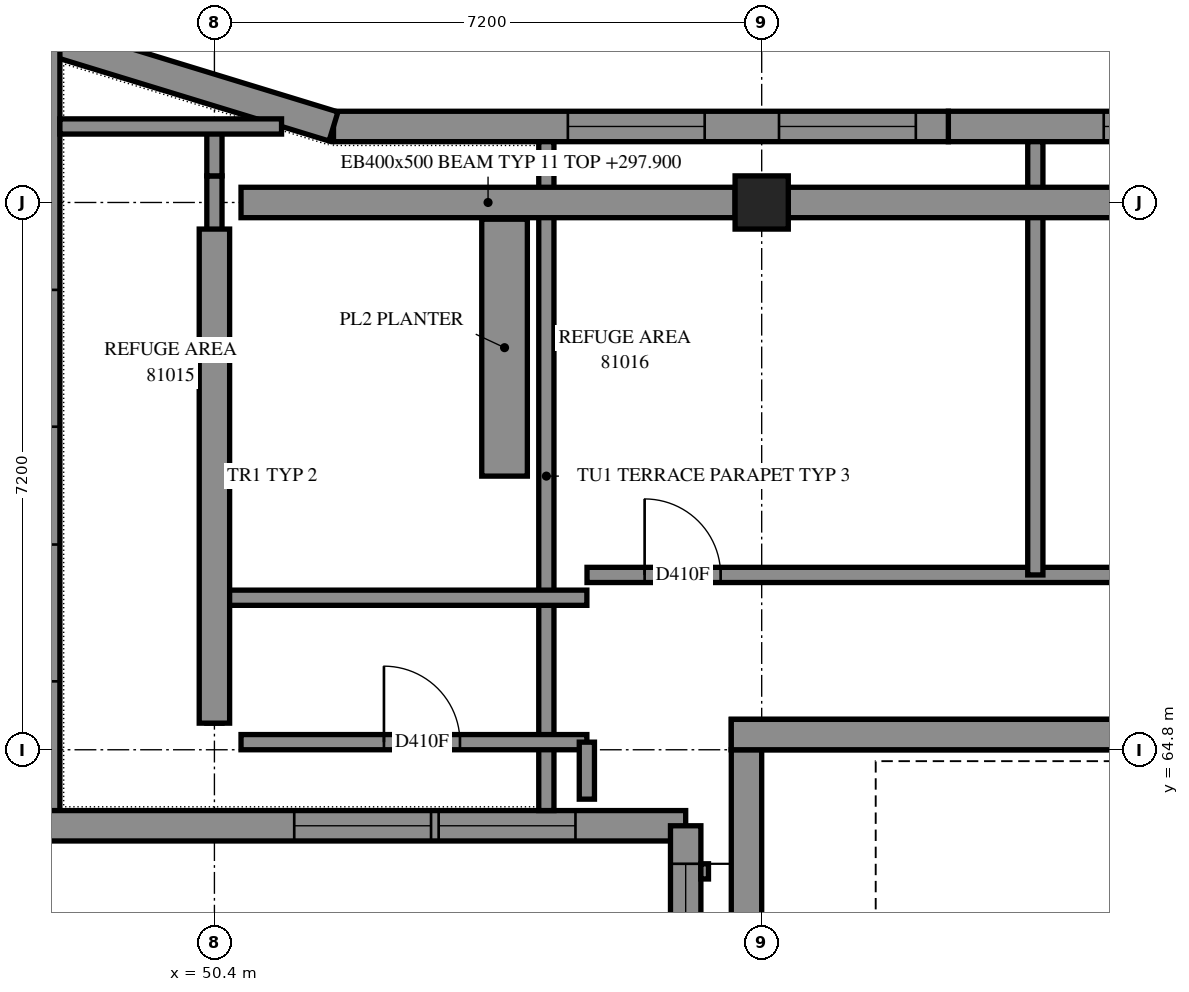
"""IFC4 building model, lengths in metres.
Left out: names, types, materials, properties, quantities, classifications, styles, units other than length and angle.
Written with IfcOpenShell. Run it as: python <this file> out.ifc"""

import sys

from ifc_helpers import new_model, si_unit, direction, frame, frame_2d, origin, origin_2d, place, context, subcontext, project, spatial, polyline, rectangle, outline, extrude, element, fill, save


model = new_model("IFC4")
c1 = context("Model", 3, precision=1e-05, world=origin(), true_north=direction((0.0, 1.0)))
c2 = subcontext(c1, "Body", "Model", "MODEL_VIEW")
j1 = project(units=[si_unit("LENGTHUNIT", "METRE"), si_unit("PLANEANGLEUNIT", "RADIAN")], contexts=[c1])
p1 = place(None, origin())
s1 = spatial("IfcSite", under=j1, at=p1, CompositionType="ELEMENT")
p2 = place(p1, origin())
s2 = spatial("IfcBuilding", under=s1, at=p2, CompositionType="ELEMENT")
p3 = place(p2, frame((0.0, 0.0, 298.2)))
s3 = spatial("IfcBuildingStorey", under=s2, at=p3, CompositionType="ELEMENT", Elevation=298.2)
p4 = place(p3, frame((57.6, 72.0, 0.0), z_axis=(0.0, 0.0, 1.0), x_axis=(1.0, 0.0, 0.0)))
e1 = element("IfcColumn", 1, at=p4, inside=s3, PredefinedType="COLUMN", context=c2, shape_type="SweptSolid", body=[
    extrude(rectangle(XDim=0.7, YDim=0.7, at=origin_2d()), origin(), (0.0, 0.0, 1.0), 3.5),
])
p5 = place(p3, frame((57.2, 65.0, -0.3), z_axis=(0.0, 0.0, 1.0), x_axis=(1.0, 0.0, 0.0)))
e2 = element("IfcWall", 2, at=p5, inside=s3, PredefinedType="SHEAR", context=c2, shape_type="SweptSolid", body=[
    extrude(outline(polyline([(0.0, 0.0), (15.2, 0.0), (15.2, 3.1), (0.0, 3.1), (0.0, 0.0)])), frame((0.0, 0.2, 0.0), z_axis=(0.0, -1.0, 0.0), x_axis=(1.0, 0.0, 0.0)), (0.0, 0.0, 1.0), 0.4),
])
p6 = place(p5, frame((10.4, 0.0, 0.3)))
e3 = element("IfcOpeningElement", 3, at=p6, cuts=e2, PredefinedType="OPENING", context=c2, shape_type="SweptSolid", body=[
    extrude(rectangle(XDim=0.8, YDim=2.1, at=frame_2d((0.4, 1.05))), frame((0.0, 0.21, 0.0), z_axis=(0.0, -1.0, 0.0), x_axis=(1.0, 0.0, 0.0)), (0.0, 0.0, 1.0), 0.42),
])
p7 = place(p3, frame((57.4, 57.1, -0.3), z_axis=(0.0, 0.0, 1.0), x_axis=(0.0, 1.0, 0.0)))
e4 = element("IfcWall", 4, at=p7, inside=s3, PredefinedType="SHEAR", context=c2, shape_type="SweptSolid", body=[
    extrude(outline(polyline([(0.0, 0.0), (7.7, 0.0), (7.7, 3.1), (0.0, 3.1), (0.0, 0.0)])), frame((0.0, 0.2, 0.0), z_axis=(0.0, -1.0, 0.0), x_axis=(1.0, 0.0, 0.0)), (0.0, 0.0, 1.0), 0.4),
])
p8 = place(p3, frame((68.115, 73.0, 0.0), z_axis=(0.0, 0.0, 1.0), x_axis=(-1.0, 0.0, 0.0)))
e5 = element("IfcWall", 5, at=p8, inside=s3, PredefinedType="SOLIDWALL", context=c2, shape_type="SweptSolid", body=[
    extrude(outline(polyline([(0.0, -0.2), (8.059, -0.2), (8.059, 0.2), (0.0, 0.2), (0.0, -0.2)])), origin(), (0.0, 0.0, 1.0), 3.0),
])
p9 = place(p8, frame((0.857, 0.0, 0.7)))
e6 = element("IfcOpeningElement", 6, at=p9, cuts=e5, PredefinedType="OPENING", context=c2, shape_type="SweptSolid", body=[
    extrude(rectangle(XDim=1.8, YDim=2.2, at=frame_2d((0.9, 1.1))), frame((0.0, 0.21, 0.0), z_axis=(0.0, -1.0, 0.0), x_axis=(1.0, 0.0, 0.0)), (0.0, 0.0, 1.0), 0.42),
])
p10 = place(p8, frame((4.215, 0.0, 0.7)))
e7 = element("IfcOpeningElement", 7, at=p10, cuts=e5, PredefinedType="OPENING", context=c2, shape_type="SweptSolid", body=[
    extrude(rectangle(XDim=1.8, YDim=2.2, at=frame_2d((0.9, 1.1))), frame((0.0, 0.21, 0.0), z_axis=(0.0, -1.0, 0.0), x_axis=(1.0, 0.0, 0.0)), (0.0, 0.0, 1.0), 0.42),
])
p11 = place(p3, frame((60.056, 73.0, 0.0), z_axis=(0.0, 0.0, 1.0), x_axis=(-1.0, 0.0, 0.0)))
e8 = element("IfcWall", 8, at=p11, inside=s3, PredefinedType="SOLIDWALL", context=c2, shape_type="SweptSolid", body=[
    extrude(outline(polyline([(0.0, -0.2), (8.059, -0.2), (8.119, 0.2), (0.0, 0.2), (0.0, -0.2)])), origin(), (0.0, 0.0, 1.0), 3.5),
])
p12 = place(p11, frame((0.428, 0.0, 0.7)))
e9 = element("IfcOpeningElement", 9, at=p12, cuts=e8, PredefinedType="OPENING", context=c2, shape_type="SweptSolid", body=[
    extrude(rectangle(XDim=1.8, YDim=2.2, at=frame_2d((0.9, 1.1))), frame((0.0, 0.21, 0.0), z_axis=(0.0, -1.0, 0.0), x_axis=(1.0, 0.0, 0.0)), (0.0, 0.0, 1.0), 0.42),
])
p13 = place(p11, frame((3.206, 0.0, 0.7)))
e10 = element("IfcOpeningElement", 10, at=p13, cuts=e8, PredefinedType="OPENING", context=c2, shape_type="SweptSolid", body=[
    extrude(rectangle(XDim=1.8, YDim=2.2, at=frame_2d((0.9, 1.1))), frame((0.0, 0.21, 0.0), z_axis=(0.0, -1.0, 0.0), x_axis=(1.0, 0.0, 0.0)), (0.0, 0.0, 1.0), 0.42),
])
p14 = place(p3, frame((51.967, 73.0, 0.0), z_axis=(0.0, 0.0, 1.0), x_axis=(-0.9562403408, 0.2925823144, 0.0)))
e11 = element("IfcWall", 11, at=p14, inside=s3, PredefinedType="SOLIDWALL", context=c2, shape_type="SweptSolid", body=[
    extrude(outline(polyline([(0.03, -0.2), (4.244, -0.2), (3.703, 0.2), (-0.03, 0.2), (0.03, -0.2)])), origin(), (0.0, 0.0, 1.0), 3.5),
])
p15 = place(p3, frame((48.167, 74.163, 0.0), z_axis=(0.0, 0.0, 1.0), x_axis=(0.0, -1.0, 0.0)))
e12 = element("IfcWall", 12, at=p15, inside=s3, PredefinedType="SOLIDWALL", context=c2, shape_type="SweptSolid", body=[
    extrude(outline(polyline([(-0.27, -0.2), (10.563, -0.2), (10.163, 0.2), (0.27, 0.2), (-0.27, -0.2)])), origin(), (0.0, 0.0, 1.0), 3.5),
])
p16 = place(p15, frame((3.313, 0.0, 0.7)))
e13 = element("IfcOpeningElement", 13, at=p16, cuts=e12, PredefinedType="OPENING", context=c2, shape_type="SweptSolid", body=[
    extrude(rectangle(XDim=1.8, YDim=2.2, at=frame_2d((0.9, 1.1))), frame((0.0, 0.21, 0.0), z_axis=(0.0, -1.0, 0.0), x_axis=(1.0, 0.0, 0.0)), (0.0, 0.0, 1.0), 0.42),
])
p17 = place(p15, frame((6.663, 0.0, 0.7)))
e14 = element("IfcOpeningElement", 14, at=p17, cuts=e12, PredefinedType="OPENING", context=c2, shape_type="SweptSolid", body=[
    extrude(rectangle(XDim=1.8, YDim=2.2, at=frame_2d((0.9, 1.1))), frame((0.0, 0.21, 0.0), z_axis=(0.0, -1.0, 0.0), x_axis=(1.0, 0.0, 0.0)), (0.0, 0.0, 1.0), 0.42),
])
p18 = place(p3, frame((48.167, 63.8, 0.0), z_axis=(0.0, 0.0, 1.0), x_axis=(1.0, 0.0, 0.0)))
e15 = element("IfcWall", 15, at=p18, inside=s3, PredefinedType="SOLIDWALL", context=c2, shape_type="SweptSolid", body=[
    extrude(outline(polyline([(-0.2, -0.2), (8.233, -0.2), (8.233, 0.2), (0.2, 0.2), (-0.2, -0.2)])), origin(), (0.0, 0.0, 1.0), 3.5),
])
p19 = place(p18, frame((3.283, 0.0, 0.7)))
e16 = element("IfcOpeningElement", 16, at=p19, cuts=e15, PredefinedType="OPENING", context=c2, shape_type="SweptSolid", body=[
    extrude(rectangle(XDim=1.8, YDim=2.2, at=frame_2d((0.9, 1.1))), frame((0.0, 0.21, 0.0), z_axis=(0.0, -1.0, 0.0), x_axis=(1.0, 0.0, 0.0)), (0.0, 0.0, 1.0), 0.42),
])
p20 = place(p18, frame((5.183, 0.0, 0.7)))
e17 = element("IfcOpeningElement", 17, at=p20, cuts=e15, PredefinedType="OPENING", context=c2, shape_type="SweptSolid", body=[
    extrude(rectangle(XDim=1.8, YDim=2.2, at=frame_2d((0.9, 1.1))), frame((0.0, 0.21, 0.0), z_axis=(0.0, -1.0, 0.0), x_axis=(1.0, 0.0, 0.0)), (0.0, 0.0, 1.0), 0.42),
])
p21 = place(p3, frame((56.6, 63.8, 0.0), z_axis=(0.0, 0.0, 1.0), x_axis=(0.0, -1.0, 0.0)))
e18 = element("IfcWall", 18, at=p21, inside=s3, PredefinedType="SOLIDWALL", context=c2, shape_type="SweptSolid", body=[
    extrude(outline(polyline([(-0.2, -0.2), (7.4, -0.2), (7.0, 0.2), (-0.2, 0.2), (-0.2, -0.2)])), origin(), (0.0, 0.0, 1.0), 3.5),
])
p22 = place(p21, frame((0.5, 0.0, 0.7)))
e19 = element("IfcOpeningElement", 19, at=p22, cuts=e18, PredefinedType="OPENING", context=c2, shape_type="SweptSolid", body=[
    extrude(rectangle(XDim=1.8, YDim=2.2, at=frame_2d((0.9, 1.1))), frame((0.0, 0.21, 0.0), z_axis=(0.0, -1.0, 0.0), x_axis=(1.0, 0.0, 0.0)), (0.0, 0.0, 1.0), 0.42),
])
p23 = place(p21, frame((3.5, 0.0, 0.7)))
e20 = element("IfcOpeningElement", 20, at=p23, cuts=e18, PredefinedType="OPENING", context=c2, shape_type="SweptSolid", body=[
    extrude(rectangle(XDim=1.8, YDim=2.2, at=frame_2d((0.9, 1.1))), frame((0.0, 0.21, 0.0), z_axis=(0.0, -1.0, 0.0), x_axis=(1.0, 0.0, 0.0)), (0.0, 0.0, 1.0), 0.42),
])
p24 = place(p3, frame((54.767, 64.0, 0.0), z_axis=(0.0, 0.0, 1.0), x_axis=(0.0, 1.0, 0.0)))
e21 = element("IfcWall", 21, at=p24, inside=s3, PredefinedType="PARAPET", context=c2, shape_type="SweptSolid", body=[
    extrude(outline(polyline([(0.0, -0.1), (8.8, -0.1), (8.8, 0.1), (0.0, 0.1), (0.0, -0.1)])), origin(), (0.0, 0.0, 1.0), 0.25),
])
p25 = place(p3, frame((56.9, 63.2, 0.0), z_axis=(0.0, 0.0, 1.0), x_axis=(-1.0, 0.0, 0.0)))
e22 = element("IfcWall", 22, at=p25, inside=s3, PredefinedType="PARAPET", context=c2, shape_type="SweptSolid", body=[
    extrude(outline(polyline([(0.0, -0.1), (0.1, -0.1), (0.1, 0.1), (0.0, 0.1), (0.0, -0.1)])), origin(), (0.0, 0.0, 1.0), 0.25),
])
p26 = place(p3, frame((55.302, 67.1, 0.0), z_axis=(0.0, 0.0, 1.0), x_axis=(1.0, 0.0, 0.0)))
e23 = element("IfcWall", 23, at=p26, inside=s3, PredefinedType="PARTITIONING", context=c2, shape_type="SweptSolid", body=[
    extrude(rectangle(XDim=18.998, YDim=0.2, at=frame_2d((9.499, 0.0))), origin(), (0.0, 0.0, 1.0), 3.5),
])
p27 = place(p26, frame((0.758, 0.0, 0.0)))
e24 = element("IfcOpeningElement", 24, at=p27, cuts=e23, PredefinedType="OPENING", context=c2, shape_type="SweptSolid", body=[
    extrude(rectangle(XDim=1.0, YDim=2.1, at=frame_2d((0.5, 1.05))), frame((0.0, 0.11, 0.0), z_axis=(0.0, -1.0, 0.0), x_axis=(1.0, 0.0, 0.0)), (0.0, 0.0, 1.0), 0.22),
])
p28 = place(p26, frame((10.04, 0.0, 0.0)))
e25 = element("IfcOpeningElement", 25, at=p28, cuts=e23, PredefinedType="OPENING", context=c2, shape_type="SweptSolid", body=[
    extrude(rectangle(XDim=1.0, YDim=2.1, at=frame_2d((0.5, 1.05))), frame((0.0, 0.11, 0.0), z_axis=(0.0, -1.0, 0.0), x_axis=(1.0, 0.0, 0.0)), (0.0, 0.0, 1.0), 0.22),
])
p29 = place(p3, frame((50.4, 66.8, 0.0), z_axis=(0.0, 0.0, 1.0), x_axis=(1.0, 0.0, 0.0)))
e26 = element("IfcWall", 26, at=p29, inside=s3, PredefinedType="PARTITIONING", context=c2, shape_type="SweptSolid", body=[
    extrude(rectangle(XDim=4.9, YDim=0.2, at=frame_2d((2.45, 0.0))), origin(), (0.0, 0.0, 1.0), 3.5),
])
p30 = place(p3, frame((50.4, 66.8, 0.0), z_axis=(0.0, 0.0, 1.0), x_axis=(0.0, 1.0, 0.0)))
e27 = element("IfcWall", 27, at=p30, inside=s3, PredefinedType="PARTITIONING", context=c2, shape_type="SweptSolid", body=[
    extrude(rectangle(XDim=5.55, YDim=0.2, at=frame_2d((2.775, 0.0))), origin(), (0.0, 0.0, 1.0), 3.5),
])
p31 = place(p3, frame((50.75, 64.9, 0.0), z_axis=(0.0, 0.0, 1.0), x_axis=(1.0, 0.0, 0.0)))
e28 = element("IfcWall", 28, at=p31, inside=s3, PredefinedType="PARTITIONING", context=c2, shape_type="SweptSolid", body=[
    extrude(rectangle(XDim=4.55, YDim=0.2, at=frame_2d((2.275, 0.0))), origin(), (0.0, 0.0, 1.0), 3.5),
])
p32 = place(p31, frame((1.88, 0.0, 0.0)))
e29 = element("IfcOpeningElement", 29, at=p32, cuts=e28, PredefinedType="OPENING", context=c2, shape_type="SweptSolid", body=[
    extrude(rectangle(XDim=1.0, YDim=2.1, at=frame_2d((0.5, 1.05))), frame((0.0, 0.11, 0.0), z_axis=(0.0, -1.0, 0.0), x_axis=(1.0, 0.0, 0.0)), (0.0, 0.0, 1.0), 0.22),
])
p33 = place(p3, frame((50.4, 65.15, 0.0), z_axis=(0.0, 0.0, 1.0), x_axis=(0.0, 1.0, 0.0)))
e30 = element("IfcWall", 30, at=p33, inside=s3, PredefinedType="PARTITIONING", context=c2, shape_type="SweptSolid", body=[
    extrude(rectangle(XDim=1.65, YDim=0.2, at=frame_2d((0.825, 0.0))), origin(), (0.0, 0.0, 1.0), 3.5),
])
p34 = place(p3, frame((55.3, 64.15, 0.0), z_axis=(0.0, 0.0, 1.0), x_axis=(0.0, 1.0, 0.0)))
e31 = element("IfcWall", 31, at=p34, inside=s3, PredefinedType="PARTITIONING", context=c2, shape_type="SweptSolid", body=[
    extrude(rectangle(XDim=0.75, YDim=0.2, at=frame_2d((0.375, 0.0))), origin(), (0.0, 0.0, 1.0), 3.5),
])
p35 = place(p3, frame((50.4, 72.35, 0.0), z_axis=(0.0, 0.0, 1.0), x_axis=(0.0, 1.0, 0.0)))
e32 = element("IfcWall", 32, at=p35, inside=s3, PredefinedType="PARTITIONING", context=c2, shape_type="SweptSolid", body=[
    extrude(rectangle(XDim=0.65, YDim=0.2, at=frame_2d((0.325, 0.0))), origin(), (0.0, 0.0, 1.0), 3.5),
])
p36 = place(p3, frame((54.217, 68.4, 0.0), z_axis=(0.0, 0.0, 1.0), x_axis=(0.0, 1.0, 0.0)))
e33 = element("IfcWall", 33, at=p36, inside=s3, PredefinedType="SOLIDWALL", context=c2, shape_type="SweptSolid", body=[
    extrude(outline(polyline([(0.0, -0.3), (3.38, -0.3), (3.38, 0.3), (0.0, 0.3), (0.0, -0.3)])), origin(), (0.0, 0.0, 1.0), 0.65),
])
p37 = place(p3, frame((48.367, 73.0, 0.0), z_axis=(0.0, 0.0, 1.0), x_axis=(1.0, 0.0, 0.0)))
e34 = element("IfcWall", 34, at=p37, inside=s3, PredefinedType="PARTITIONING", context=c2, shape_type="SweptSolid", body=[
    extrude(outline(polyline([(0.0, -0.1), (2.916, -0.1), (2.916, 0.1), (0.0, 0.1), (0.0, -0.1)])), origin(), (0.0, 0.0, 1.0), 3.5),
])
p38 = place(p3, frame((61.2, 67.1, 0.0), z_axis=(0.0, 0.0, 1.0), x_axis=(0.0, 1.0, 0.0)))
e35 = element("IfcWall", 35, at=p38, inside=s3, PredefinedType="PARTITIONING", context=c2, shape_type="SweptSolid", body=[
    extrude(outline(polyline([(0.0, -0.1), (5.7, -0.1), (5.7, 0.1), (0.0, 0.1), (0.0, -0.1)])), origin(), (0.0, 0.0, 1.0), 3.5),
])
p39 = place(p10, origin())
e36 = element("IfcWindow", 36, at=p39, inside=s3, PartitioningType="SINGLE_PANEL", PredefinedType="WINDOW", context=c2, shape_type="SweptSolid", body=[
    extrude(rectangle(XDim=1.8, YDim=2.2, at=frame_2d((0.9, 1.1))), frame((0.0, 0.08, 0.0), z_axis=(0.0, -1.0, 0.0), x_axis=(1.0, 0.0, 0.0)), (0.0, 0.0, 1.0), 0.06),
])
fill(e7, e36)
p40 = place(p12, origin())
e37 = element("IfcWindow", 37, at=p40, inside=s3, PartitioningType="SINGLE_PANEL", PredefinedType="WINDOW", context=c2, shape_type="SweptSolid", body=[
    extrude(rectangle(XDim=1.8, YDim=2.2, at=frame_2d((0.9, 1.1))), frame((0.0, 0.08, 0.0), z_axis=(0.0, -1.0, 0.0), x_axis=(1.0, 0.0, 0.0)), (0.0, 0.0, 1.0), 0.06),
])
fill(e9, e37)
p41 = place(p13, origin())
e38 = element("IfcWindow", 38, at=p41, inside=s3, PartitioningType="SINGLE_PANEL", PredefinedType="WINDOW", context=c2, shape_type="SweptSolid", body=[
    extrude(rectangle(XDim=1.8, YDim=2.2, at=frame_2d((0.9, 1.1))), frame((0.0, 0.08, 0.0), z_axis=(0.0, -1.0, 0.0), x_axis=(1.0, 0.0, 0.0)), (0.0, 0.0, 1.0), 0.06),
])
fill(e10, e38)
p42 = place(p19, origin())
e39 = element("IfcWindow", 39, at=p42, inside=s3, PartitioningType="SINGLE_PANEL", PredefinedType="WINDOW", context=c2, shape_type="SweptSolid", body=[
    extrude(rectangle(XDim=1.8, YDim=2.2, at=frame_2d((0.9, 1.1))), frame((0.0, 0.08, 0.0), z_axis=(0.0, -1.0, 0.0), x_axis=(1.0, 0.0, 0.0)), (0.0, 0.0, 1.0), 0.06),
])
fill(e16, e39)
p43 = place(p20, origin())
e40 = element("IfcWindow", 40, at=p43, inside=s3, PartitioningType="SINGLE_PANEL", PredefinedType="WINDOW", context=c2, shape_type="SweptSolid", body=[
    extrude(rectangle(XDim=1.8, YDim=2.2, at=frame_2d((0.9, 1.1))), frame((0.0, 0.08, 0.0), z_axis=(0.0, -1.0, 0.0), x_axis=(1.0, 0.0, 0.0)), (0.0, 0.0, 1.0), 0.06),
])
fill(e17, e40)
p44 = place(p22, origin())
e41 = element("IfcWindow", 41, at=p44, inside=s3, PartitioningType="SINGLE_PANEL", PredefinedType="WINDOW", context=c2, shape_type="SweptSolid", body=[
    extrude(rectangle(XDim=1.8, YDim=2.2, at=frame_2d((0.9, 1.1))), frame((0.0, 0.08, 0.0), z_axis=(0.0, -1.0, 0.0), x_axis=(1.0, 0.0, 0.0)), (0.0, 0.0, 1.0), 0.06),
])
fill(e19, e41)
p45 = place(p32, origin())
e42 = element("IfcDoor", 42, at=p45, inside=s3, OperationType="SINGLE_SWING_RIGHT", PredefinedType="DOOR", context=c2, shape_type="SweptSolid", body=[
    extrude(rectangle(XDim=1.0, YDim=2.1, at=frame_2d((0.5, 1.05))), frame((0.0, 0.025, 0.0), z_axis=(0.0, -1.0, 0.0), x_axis=(1.0, 0.0, 0.0)), (0.0, 0.0, 1.0), 0.05),
])
fill(e29, e42)
p46 = place(p27, origin())
e43 = element("IfcDoor", 43, at=p46, inside=s3, OperationType="SINGLE_SWING_RIGHT", PredefinedType="DOOR", context=c2, shape_type="SweptSolid", body=[
    extrude(rectangle(XDim=1.0, YDim=2.1, at=frame_2d((0.5, 1.05))), frame((0.0, 0.025, 0.0), z_axis=(0.0, -1.0, 0.0), x_axis=(1.0, 0.0, 0.0)), (0.0, 0.0, 1.0), 0.05),
])
fill(e24, e43)
save(model, sys.argv[1])
